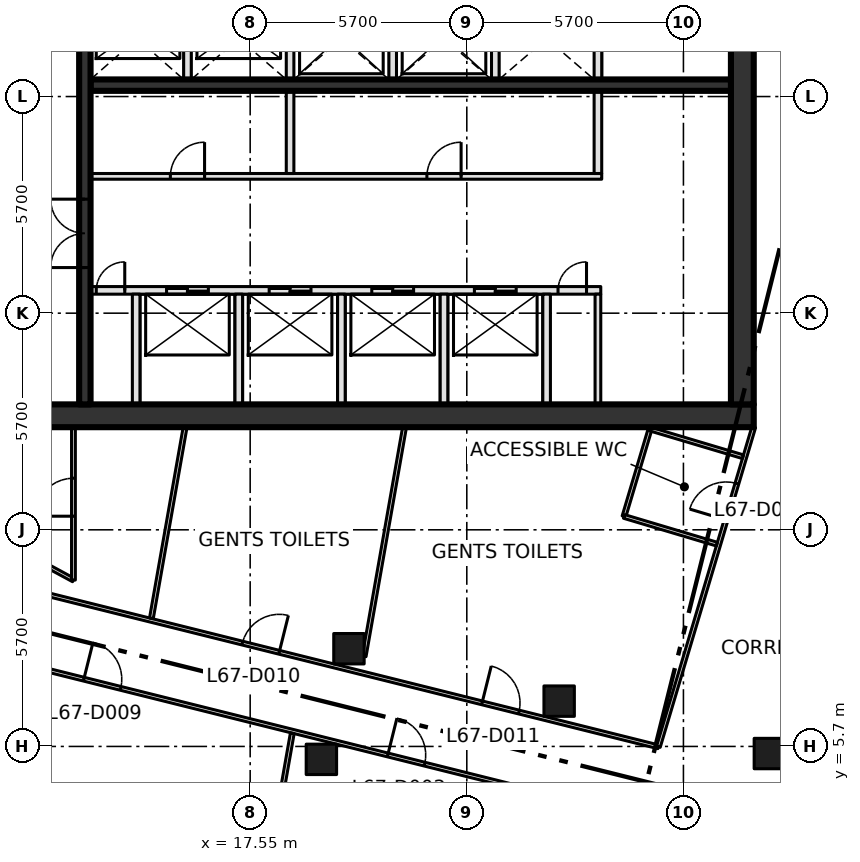
"""IFC4 building model, lengths in metres.
Left out: names, types, materials, properties, quantities, classifications, styles, units other than length and angle.
Written with IfcOpenShell. Run it as: python <this file> out.ifc"""

import sys

from ifc_helpers import new_model, si_unit, direction, frame, frame_2d, origin, origin_2d, place, context, subcontext, project, spatial, rectangle, extrude, element, fill, save


model = new_model("IFC4")
c1 = context("Model", 3, precision=1e-05, world=origin(), true_north=direction((0.0, 1.0)))
c2 = subcontext(c1, "Body", "Model", "MODEL_VIEW")
j1 = project(units=[si_unit("LENGTHUNIT", "METRE"), si_unit("PLANEANGLEUNIT", "RADIAN")], contexts=[c1])
p1 = place(None, origin())
s1 = spatial("IfcSite", under=j1, at=p1, CompositionType="ELEMENT")
p2 = place(p1, origin())
s2 = spatial("IfcBuilding", under=s1, at=p2, CompositionType="ELEMENT")
p3 = place(p2, frame((0.0, 0.0, 294.0)))
s3 = spatial("IfcBuildingStorey", under=s2, at=p3, CompositionType="ELEMENT", Elevation=294.0)
for number, where, z_axis, x_axis in (
    (1, (19.424, 5.36, 0.0), (0.0, 0.0, 1.0), (1.0, 0.0, 0.0)),
    (2, (20.149, 8.271, 0.0), (0.0, 0.0, 1.0), (1.0, 0.0, 0.0)),
    (3, (25.68, 6.892, 0.0), (0.0, 0.0, 1.0), (1.0, 0.0, 0.0)),
    (4, (31.211, 5.513, 0.0), (0.0, 0.0, 1.0), (1.0, 0.0, 0.0)),
):
    element("IfcColumn", number, at=place(p3, frame(where, z_axis=z_axis, x_axis=x_axis)), inside=s3, PredefinedType="COLUMN", context=c2, shape_type="SweptSolid", body=[
        extrude(rectangle(XDim=0.8, YDim=0.8, at=origin_2d()), origin(), (0.0, 0.0, 1.0), 4.2),
    ])
p4 = place(p3, frame((8.0, 14.4, -0.3), z_axis=(0.0, 0.0, 1.0), x_axis=(1.0, 0.0, 0.0)))
e5 = element("IfcWall", 5, at=p4, inside=s3, PredefinedType="SHEAR", context=c2, shape_type="SweptSolid", body=[
    extrude(rectangle(XDim=22.8, YDim=0.6, at=frame_2d((11.4, 0.0))), origin(), (0.0, 0.0, 1.0), 4.2),
])
p5 = place(p4, frame((2.3, 0.0, 0.3)))
e6 = element("IfcOpeningElement", 6, at=p5, cuts=e5, PredefinedType="OPENING", context=c2, shape_type="SweptSolid", body=[
    extrude(rectangle(XDim=1.8, YDim=2.1, at=frame_2d((0.9, 1.05))), frame((0.0, 0.31, 0.0), z_axis=(0.0, -1.0, 0.0), x_axis=(1.0, 0.0, 0.0)), (0.0, 0.0, 1.0), 0.62),
])
p6 = place(p3, frame((30.5, 14.7, -0.3), z_axis=(0.0, 0.0, 1.0), x_axis=(0.0, 1.0, 0.0)))
e7 = element("IfcWall", 7, at=p6, inside=s3, PredefinedType="SHEAR", context=c2, shape_type="SweptSolid", body=[
    extrude(rectangle(XDim=21.0, YDim=0.6, at=frame_2d((10.5, 0.0))), origin(), (0.0, 0.0, 1.0), 4.2),
])
p7 = place(p3, frame((13.35, 17.7, 0.0), z_axis=(0.0, 0.0, 1.0), x_axis=(1.0, 0.0, 0.0)))
e8 = element("IfcWall", 8, at=p7, inside=s3, PredefinedType="SOLIDWALL", context=c2, shape_type="SweptSolid", body=[
    extrude(rectangle(XDim=13.425, YDim=0.2, at=frame_2d((6.712, 0.0))), origin(), (0.0, 0.0, 1.0), 3.9),
])
p8 = place(p7, frame((2.0, 0.0, 0.0)))
e9 = element("IfcOpeningElement", 9, at=p8, cuts=e8, PredefinedType="OPENING", context=c2, shape_type="SweptSolid", body=[
    extrude(rectangle(XDim=1.1, YDim=2.1, at=frame_2d((0.55, 1.05))), frame((0.0, 0.11, 0.0), z_axis=(0.0, -1.0, 0.0), x_axis=(1.0, 0.0, 0.0)), (0.0, 0.0, 1.0), 0.22),
])
p9 = place(p7, frame((4.7, 0.0, 0.0)))
e10 = element("IfcOpeningElement", 10, at=p9, cuts=e8, PredefinedType="OPENING", context=c2, shape_type="SweptSolid", body=[
    extrude(rectangle(XDim=1.1, YDim=2.1, at=frame_2d((0.55, 1.05))), frame((0.0, 0.11, 0.0), z_axis=(0.0, -1.0, 0.0), x_axis=(1.0, 0.0, 0.0)), (0.0, 0.0, 1.0), 0.22),
])
p10 = place(p7, frame((7.4, 0.0, 0.0)))
e11 = element("IfcOpeningElement", 11, at=p10, cuts=e8, PredefinedType="OPENING", context=c2, shape_type="SweptSolid", body=[
    extrude(rectangle(XDim=1.1, YDim=2.1, at=frame_2d((0.55, 1.05))), frame((0.0, 0.11, 0.0), z_axis=(0.0, -1.0, 0.0), x_axis=(1.0, 0.0, 0.0)), (0.0, 0.0, 1.0), 0.22),
])
p11 = place(p7, frame((10.1, 0.0, 0.0)))
e12 = element("IfcOpeningElement", 12, at=p11, cuts=e8, PredefinedType="OPENING", context=c2, shape_type="SweptSolid", body=[
    extrude(rectangle(XDim=1.1, YDim=2.1, at=frame_2d((0.55, 1.05))), frame((0.0, 0.11, 0.0), z_axis=(0.0, -1.0, 0.0), x_axis=(1.0, 0.0, 0.0)), (0.0, 0.0, 1.0), 0.22),
])
p12 = place(p7, frame((0.15, 0.0, 0.0)))
e13 = element("IfcOpeningElement", 13, at=p12, cuts=e8, PredefinedType="OPENING", context=c2, shape_type="SweptSolid", body=[
    extrude(rectangle(XDim=0.75, YDim=2.1, at=frame_2d((0.375, 1.05))), frame((0.0, 0.11, 0.0), z_axis=(0.0, -1.0, 0.0), x_axis=(1.0, 0.0, 0.0)), (0.0, 0.0, 1.0), 0.22),
])
p13 = place(p7, frame((12.3, 0.0, 0.0)))
e14 = element("IfcOpeningElement", 14, at=p13, cuts=e8, PredefinedType="OPENING", context=c2, shape_type="SweptSolid", body=[
    extrude(rectangle(XDim=0.75, YDim=2.1, at=frame_2d((0.375, 1.05))), frame((0.0, 0.11, 0.0), z_axis=(0.0, -1.0, 0.0), x_axis=(1.0, 0.0, 0.0)), (0.0, 0.0, 1.0), 0.22),
])
p14 = place(p3, frame((13.35, 20.7, 0.0), z_axis=(0.0, 0.0, 1.0), x_axis=(1.0, 0.0, 0.0)))
e15 = element("IfcWall", 15, at=p14, inside=s3, PredefinedType="PARTITIONING", context=c2, shape_type="SweptSolid", body=[
    extrude(rectangle(XDim=13.45, YDim=0.15, at=frame_2d((6.725, 0.0))), origin(), (0.0, 0.0, 1.0), 3.9),
])
p15 = place(p14, frame((2.1, 0.0, 0.0)))
e16 = element("IfcOpeningElement", 16, at=p15, cuts=e15, PredefinedType="OPENING", context=c2, shape_type="SweptSolid", body=[
    extrude(rectangle(XDim=0.9, YDim=2.1, at=frame_2d((0.45, 1.05))), frame((0.0, 0.085, 0.0), z_axis=(0.0, -1.0, 0.0), x_axis=(1.0, 0.0, 0.0)), (0.0, 0.0, 1.0), 0.17),
])
p16 = place(p14, frame((8.85, 0.0, 0.0)))
e17 = element("IfcOpeningElement", 17, at=p16, cuts=e15, PredefinedType="OPENING", context=c2, shape_type="SweptSolid", body=[
    extrude(rectangle(XDim=0.9, YDim=2.1, at=frame_2d((0.45, 1.05))), frame((0.0, 0.085, 0.0), z_axis=(0.0, -1.0, 0.0), x_axis=(1.0, 0.0, 0.0)), (0.0, 0.0, 1.0), 0.17),
])
p17 = place(p3, frame((13.35, 23.1, 0.0), z_axis=(0.0, 0.0, 1.0), x_axis=(1.0, 0.0, 0.0)))
e18 = element("IfcWall", 18, at=p17, inside=s3, PredefinedType="SHEAR", context=c2, shape_type="SweptSolid", body=[
    extrude(rectangle(XDim=16.85, YDim=0.3, at=frame_2d((8.425, 0.0))), origin(), (0.0, 0.0, 1.0), 3.9),
])
p18 = place(p3, frame((13.2, 14.7, 0.0), z_axis=(0.0, 0.0, 1.0), x_axis=(0.0, 1.0, 0.0)))
e19 = element("IfcWall", 19, at=p18, inside=s3, PredefinedType="SHEAR", context=c2, shape_type="SweptSolid", body=[
    extrude(rectangle(XDim=21.0, YDim=0.3, at=frame_2d((10.5, 0.0))), origin(), (0.0, 0.0, 1.0), 3.9),
])
p19 = place(p18, frame((3.6, 0.0, 0.0)))
e20 = element("IfcOpeningElement", 20, at=p19, cuts=e19, PredefinedType="OPENING", context=c2, shape_type="SweptSolid", body=[
    extrude(rectangle(XDim=1.8, YDim=2.1, at=frame_2d((0.9, 1.05))), frame((0.0, 0.16, 0.0), z_axis=(0.0, -1.0, 0.0), x_axis=(1.0, 0.0, 0.0)), (0.0, 0.0, 1.0), 0.32),
])
p20 = place(p18, frame((11.7, 0.0, 0.0)))
e21 = element("IfcOpeningElement", 21, at=p20, cuts=e19, PredefinedType="OPENING", context=c2, shape_type="SweptSolid", body=[
    extrude(rectangle(XDim=1.2, YDim=2.1, at=frame_2d((0.6, 1.05))), frame((0.0, 0.16, 0.0), z_axis=(0.0, -1.0, 0.0), x_axis=(1.0, 0.0, 0.0)), (0.0, 0.0, 1.0), 0.32),
])
p21 = place(p3, frame((14.55, 14.7, 0.0), z_axis=(0.0, 0.0, 1.0), x_axis=(0.0, 1.0, 0.0)))
e22 = element("IfcWall", 22, at=p21, inside=s3, PredefinedType="SOLIDWALL", context=c2, shape_type="SweptSolid", body=[
    extrude(rectangle(XDim=2.9, YDim=0.2, at=frame_2d((1.45, 0.0))), origin(), (0.0, 0.0, 1.0), 3.9),
])
p22 = place(p3, frame((15.9, 23.25, 0.0), z_axis=(0.0, 0.0, 1.0), x_axis=(0.0, 1.0, 0.0)))
e23 = element("IfcWall", 23, at=p22, inside=s3, PredefinedType="SOLIDWALL", context=c2, shape_type="SweptSolid", body=[
    extrude(rectangle(XDim=2.15, YDim=0.2, at=frame_2d((1.075, 0.0))), origin(), (0.0, 0.0, 1.0), 3.9),
])
p23 = place(p3, frame((17.25, 14.7, 0.0), z_axis=(0.0, 0.0, 1.0), x_axis=(0.0, 1.0, 0.0)))
e24 = element("IfcWall", 24, at=p23, inside=s3, PredefinedType="SOLIDWALL", context=c2, shape_type="SweptSolid", body=[
    extrude(rectangle(XDim=2.9, YDim=0.2, at=frame_2d((1.45, 0.0))), origin(), (0.0, 0.0, 1.0), 3.9),
])
p24 = place(p3, frame((18.6, 20.775, 0.0), z_axis=(0.0, 0.0, 1.0), x_axis=(0.0, 1.0, 0.0)))
e25 = element("IfcWall", 25, at=p24, inside=s3, PredefinedType="SOLIDWALL", context=c2, shape_type="SweptSolid", body=[
    extrude(rectangle(XDim=7.625, YDim=0.2, at=frame_2d((3.812, 0.0))), origin(), (0.0, 0.0, 1.0), 3.9),
])
p25 = place(p24, frame((5.625, 0.0, 0.0)))
e26 = element("IfcOpeningElement", 26, at=p25, cuts=e25, PredefinedType="OPENING", context=c2, shape_type="SweptSolid", body=[
    extrude(rectangle(XDim=1.2, YDim=2.1, at=frame_2d((0.6, 1.05))), frame((0.0, 0.11, 0.0), z_axis=(0.0, -1.0, 0.0), x_axis=(1.0, 0.0, 0.0)), (0.0, 0.0, 1.0), 0.22),
])
p26 = place(p3, frame((19.95, 14.7, 0.0), z_axis=(0.0, 0.0, 1.0), x_axis=(0.0, 1.0, 0.0)))
e27 = element("IfcWall", 27, at=p26, inside=s3, PredefinedType="SOLIDWALL", context=c2, shape_type="SweptSolid", body=[
    extrude(rectangle(XDim=2.9, YDim=0.2, at=frame_2d((1.45, 0.0))), origin(), (0.0, 0.0, 1.0), 3.9),
])
p27 = place(p3, frame((21.3, 23.25, 0.0), z_axis=(0.0, 0.0, 1.0), x_axis=(0.0, 1.0, 0.0)))
e28 = element("IfcWall", 28, at=p27, inside=s3, PredefinedType="SOLIDWALL", context=c2, shape_type="SweptSolid", body=[
    extrude(rectangle(XDim=2.15, YDim=0.2, at=frame_2d((1.075, 0.0))), origin(), (0.0, 0.0, 1.0), 3.9),
])
p28 = place(p3, frame((22.65, 14.7, 0.0), z_axis=(0.0, 0.0, 1.0), x_axis=(0.0, 1.0, 0.0)))
e29 = element("IfcWall", 29, at=p28, inside=s3, PredefinedType="SOLIDWALL", context=c2, shape_type="SweptSolid", body=[
    extrude(rectangle(XDim=2.9, YDim=0.2, at=frame_2d((1.45, 0.0))), origin(), (0.0, 0.0, 1.0), 3.9),
])
p29 = place(p3, frame((24.0, 23.25, 0.0), z_axis=(0.0, 0.0, 1.0), x_axis=(0.0, 1.0, 0.0)))
e30 = element("IfcWall", 30, at=p29, inside=s3, PredefinedType="SOLIDWALL", context=c2, shape_type="SweptSolid", body=[
    extrude(rectangle(XDim=2.15, YDim=0.2, at=frame_2d((1.075, 0.0))), origin(), (0.0, 0.0, 1.0), 3.9),
])
p30 = place(p3, frame((25.35, 14.7, 0.0), z_axis=(0.0, 0.0, 1.0), x_axis=(0.0, 1.0, 0.0)))
e31 = element("IfcWall", 31, at=p30, inside=s3, PredefinedType="SOLIDWALL", context=c2, shape_type="SweptSolid", body=[
    extrude(rectangle(XDim=2.9, YDim=0.2, at=frame_2d((1.45, 0.0))), origin(), (0.0, 0.0, 1.0), 3.9),
])
p31 = place(p3, frame((26.7, 14.7, 0.0), z_axis=(0.0, 0.0, 1.0), x_axis=(0.0, 1.0, 0.0)))
e32 = element("IfcWall", 32, at=p31, inside=s3, PredefinedType="PARTITIONING", context=c2, shape_type="SweptSolid", body=[
    extrude(rectangle(XDim=2.9, YDim=0.15, at=frame_2d((1.45, 0.0))), origin(), (0.0, 0.0, 1.0), 3.9),
])
p32 = place(p3, frame((26.7, 20.775, 0.0), z_axis=(0.0, 0.0, 1.0), x_axis=(0.0, 1.0, 0.0)))
e33 = element("IfcWall", 33, at=p32, inside=s3, PredefinedType="SOLIDWALL", context=c2, shape_type="SweptSolid", body=[
    extrude(rectangle(XDim=4.625, YDim=0.2, at=frame_2d((2.312, 0.0))), origin(), (0.0, 0.0, 1.0), 3.9),
])
p33 = place(p3, frame((8.535, 8.626, 0.0), z_axis=(0.0, 0.0, 1.0), x_axis=(0.970294986727, -0.241924861749, 0.0)))
e34 = element("IfcWall", 34, at=p33, inside=s3, PredefinedType="PARTITIONING", context=c2, shape_type="SweptSolid", body=[
    extrude(rectangle(XDim=28.501, YDim=0.1, at=frame_2d((14.25, 0.0))), origin(), (0.0, 0.0, 1.0), 3.9),
])
p34 = place(p33, frame((13.022, 0.0, 0.0)))
e35 = element("IfcOpeningElement", 35, at=p34, cuts=e34, PredefinedType="OPENING", context=c2, shape_type="SweptSolid", body=[
    extrude(rectangle(XDim=1.0, YDim=2.1, at=frame_2d((0.5, 1.05))), frame((0.0, 0.06, 0.0), z_axis=(0.0, -1.0, 0.0), x_axis=(1.0, 0.0, 0.0)), (0.0, 0.0, 1.0), 0.12),
])
p35 = place(p33, frame((20.622, 0.0, 0.0)))
e36 = element("IfcOpeningElement", 36, at=p35, cuts=e34, PredefinedType="OPENING", context=c2, shape_type="SweptSolid", body=[
    extrude(rectangle(XDim=1.0, YDim=2.1, at=frame_2d((0.5, 1.05))), frame((0.0, 0.06, 0.0), z_axis=(0.0, -1.0, 0.0), x_axis=(1.0, 0.0, 0.0)), (0.0, 0.0, 1.0), 0.12),
])
p36 = place(p33, frame((4.78, 0.0, 0.0)))
e37 = element("IfcOpeningElement", 37, at=p36, cuts=e34, PredefinedType="OPENING", context=c2, shape_type="SweptSolid", body=[
    extrude(rectangle(XDim=1.0, YDim=2.1, at=frame_2d((0.5, 1.05))), frame((0.0, 0.06, 0.0), z_axis=(0.0, -1.0, 0.0), x_axis=(1.0, 0.0, 0.0)), (0.0, 0.0, 1.0), 0.12),
])
p37 = place(p3, frame((9.002, 10.499, 0.0), z_axis=(0.0, 0.0, 1.0), x_axis=(0.970298340477, -0.241911410372, 0.0)))
e38 = element("IfcWall", 38, at=p37, inside=s3, PredefinedType="PARTITIONING", context=c2, shape_type="SweptSolid", body=[
    extrude(rectangle(XDim=19.88, YDim=0.1, at=frame_2d((9.94, 0.0))), origin(), (0.0, 0.0, 1.0), 3.9),
])
p38 = place(p37, frame((8.597, 0.0, 0.0)))
e39 = element("IfcOpeningElement", 39, at=p38, cuts=e38, PredefinedType="OPENING", context=c2, shape_type="SweptSolid", body=[
    extrude(rectangle(XDim=1.0, YDim=2.1, at=frame_2d((0.5, 1.05))), frame((0.0, 0.06, 0.0), z_axis=(0.0, -1.0, 0.0), x_axis=(1.0, 0.0, 0.0)), (0.0, 0.0, 1.0), 0.12),
])
p39 = place(p37, frame((15.098, 0.0, 0.0)))
e40 = element("IfcOpeningElement", 40, at=p39, cuts=e38, PredefinedType="OPENING", context=c2, shape_type="SweptSolid", body=[
    extrude(rectangle(XDim=1.0, YDim=2.1, at=frame_2d((0.5, 1.05))), frame((0.0, 0.06, 0.0), z_axis=(0.0, -1.0, 0.0), x_axis=(1.0, 0.0, 0.0)), (0.0, 0.0, 1.0), 0.12),
])
p40 = place(p3, frame((9.9, 11.7, 0.0), z_axis=(0.0, 0.0, 1.0), x_axis=(0.87965147249, -0.475618846291, 0.0)))
e41 = element("IfcWall", 41, at=p40, inside=s3, PredefinedType="PARTITIONING", context=c2, shape_type="SweptSolid", body=[
    extrude(rectangle(XDim=3.41, YDim=0.1, at=frame_2d((1.705, 0.0))), origin(), (0.0, 0.0, 1.0), 3.9),
])
p41 = place(p3, frame((12.9, 10.078, 0.0), z_axis=(0.0, 0.0, 1.0), x_axis=(0.0, 1.0, 0.0)))
e42 = element("IfcWall", 42, at=p41, inside=s3, PredefinedType="PARTITIONING", context=c2, shape_type="SweptSolid", body=[
    extrude(rectangle(XDim=4.022, YDim=0.1, at=frame_2d((2.011, 0.0))), origin(), (0.0, 0.0, 1.0), 3.9),
])
p42 = place(p41, frame((1.68, 0.0, 0.0)))
e43 = element("IfcOpeningElement", 43, at=p42, cuts=e42, PredefinedType="OPENING", context=c2, shape_type="SweptSolid", body=[
    extrude(rectangle(XDim=1.0, YDim=2.1, at=frame_2d((0.5, 1.05))), frame((0.0, 0.06, 0.0), z_axis=(0.0, -1.0, 0.0), x_axis=(1.0, 0.0, 0.0)), (0.0, 0.0, 1.0), 0.12),
])
p43 = place(p3, frame((28.291, 5.69, 0.0), z_axis=(0.0, 0.0, 1.0), x_axis=(0.28588265334, 0.958264633867, 0.0)))
e44 = element("IfcWall", 44, at=p43, inside=s3, PredefinedType="PARTITIONING", context=c2, shape_type="SweptSolid", body=[
    extrude(rectangle(XDim=8.776, YDim=0.1, at=frame_2d((4.388, 0.0))), origin(), (0.0, 0.0, 1.0), 3.9),
])
p44 = place(p43, frame((6.23, 0.0, 0.0)))
e45 = element("IfcOpeningElement", 45, at=p44, cuts=e44, PredefinedType="OPENING", context=c2, shape_type="SweptSolid", body=[
    extrude(rectangle(XDim=1.0, YDim=2.1, at=frame_2d((0.5, 1.05))), frame((0.0, 0.06, 0.0), z_axis=(0.0, -1.0, 0.0), x_axis=(1.0, 0.0, 0.0)), (0.0, 0.0, 1.0), 0.12),
])
p45 = place(p3, frame((14.951, 9.071, 0.0), z_axis=(0.0, 0.0, 1.0), x_axis=(0.173687149785, 0.984800880381, 0.0)))
e46 = element("IfcWall", 46, at=p45, inside=s3, PredefinedType="PARTITIONING", context=c2, shape_type="SweptSolid", body=[
    extrude(rectangle(XDim=5.107, YDim=0.1, at=frame_2d((2.553, 0.0))), origin(), (0.0, 0.0, 1.0), 3.9),
])
p46 = place(p3, frame((17.021, -3.238, 0.0), z_axis=(0.0, 0.0, 1.0), x_axis=(0.173621363154, 0.984812480758, 0.0)))
e47 = element("IfcWall", 47, at=p46, inside=s3, PredefinedType="PARTITIONING", context=c2, shape_type="SweptSolid", body=[
    extrude(rectangle(XDim=9.428, YDim=0.1, at=frame_2d((4.714, 0.0))), origin(), (0.0, 0.0, 1.0), 3.9),
])
p47 = place(p3, frame((20.549, 8.07, 0.0), z_axis=(0.0, 0.0, 1.0), x_axis=(0.173605636367, 0.984815253244, 0.0)))
e48 = element("IfcWall", 48, at=p47, inside=s3, PredefinedType="PARTITIONING", context=c2, shape_type="SweptSolid", body=[
    extrude(rectangle(XDim=6.123, YDim=0.1, at=frame_2d((3.062, 0.0))), origin(), (0.0, 0.0, 1.0), 3.9),
])
p48 = place(p3, frame((27.386, 11.752, 0.0), z_axis=(0.0, 0.0, 1.0), x_axis=(0.285826425332, 0.958281406781, 0.0)))
e49 = element("IfcWall", 49, at=p48, inside=s3, PredefinedType="PARTITIONING", context=c2, shape_type="SweptSolid", body=[
    extrude(rectangle(XDim=2.4, YDim=0.1, at=frame_2d((1.2, 0.0))), origin(), (0.0, 0.0, 1.0), 3.9),
])
for number, where, z_axis, x_axis in (
    (50, (28.072, 14.052, 0.0), (0.0, 0.0, 1.0), (0.958, -0.286, 0.0)),
    (51, (29.83, 11.023, 0.0), (0.0, 0.0, 1.0), (-0.958, 0.286, 0.0)),
):
    element("IfcWall", number, at=place(p3, frame(where, z_axis=z_axis, x_axis=x_axis)), inside=s3, PredefinedType="PARTITIONING", context=c2, shape_type="SweptSolid", body=[
        extrude(rectangle(XDim=2.551, YDim=0.1, at=frame_2d((1.275, 0.0))), origin(), (0.0, 0.0, 1.0), 3.9),
    ])
p49 = place(p8, origin())
e52 = element("IfcDoor", 52, at=p49, inside=s3, OperationType="SLIDING_TO_LEFT", PredefinedType="DOOR", context=c2, shape_type="SweptSolid", body=[
    extrude(rectangle(XDim=1.1, YDim=2.1, at=frame_2d((0.55, 1.05))), frame((0.0, 0.025, 0.0), z_axis=(0.0, -1.0, 0.0), x_axis=(1.0, 0.0, 0.0)), (0.0, 0.0, 1.0), 0.05),
])
fill(e9, e52)
p50 = place(p9, origin())
e53 = element("IfcDoor", 53, at=p50, inside=s3, OperationType="SLIDING_TO_LEFT", PredefinedType="DOOR", context=c2, shape_type="SweptSolid", body=[
    extrude(rectangle(XDim=1.1, YDim=2.1, at=frame_2d((0.55, 1.05))), frame((0.0, 0.025, 0.0), z_axis=(0.0, -1.0, 0.0), x_axis=(1.0, 0.0, 0.0)), (0.0, 0.0, 1.0), 0.05),
])
fill(e10, e53)
p51 = place(p10, origin())
e54 = element("IfcDoor", 54, at=p51, inside=s3, OperationType="SLIDING_TO_LEFT", PredefinedType="DOOR", context=c2, shape_type="SweptSolid", body=[
    extrude(rectangle(XDim=1.1, YDim=2.1, at=frame_2d((0.55, 1.05))), frame((0.0, 0.025, 0.0), z_axis=(0.0, -1.0, 0.0), x_axis=(1.0, 0.0, 0.0)), (0.0, 0.0, 1.0), 0.05),
])
fill(e11, e54)
p52 = place(p11, origin())
e55 = element("IfcDoor", 55, at=p52, inside=s3, OperationType="SLIDING_TO_LEFT", PredefinedType="DOOR", context=c2, shape_type="SweptSolid", body=[
    extrude(rectangle(XDim=1.1, YDim=2.1, at=frame_2d((0.55, 1.05))), frame((0.0, 0.025, 0.0), z_axis=(0.0, -1.0, 0.0), x_axis=(1.0, 0.0, 0.0)), (0.0, 0.0, 1.0), 0.05),
])
fill(e12, e55)
p53 = place(p12, origin())
e56 = element("IfcDoor", 56, at=p53, inside=s3, OperationType="SINGLE_SWING_RIGHT", PredefinedType="DOOR", context=c2, shape_type="SweptSolid", body=[
    extrude(rectangle(XDim=0.75, YDim=2.1, at=frame_2d((0.375, 1.05))), frame((0.0, 0.025, 0.0), z_axis=(0.0, -1.0, 0.0), x_axis=(1.0, 0.0, 0.0)), (0.0, 0.0, 1.0), 0.05),
])
fill(e13, e56)
p54 = place(p13, origin())
e57 = element("IfcDoor", 57, at=p54, inside=s3, OperationType="SINGLE_SWING_RIGHT", PredefinedType="DOOR", context=c2, shape_type="SweptSolid", body=[
    extrude(rectangle(XDim=0.75, YDim=2.1, at=frame_2d((0.375, 1.05))), frame((0.0, 0.025, 0.0), z_axis=(0.0, -1.0, 0.0), x_axis=(1.0, 0.0, 0.0)), (0.0, 0.0, 1.0), 0.05),
])
fill(e14, e57)
p55 = place(p15, origin())
e58 = element("IfcDoor", 58, at=p55, inside=s3, OperationType="SINGLE_SWING_RIGHT", PredefinedType="DOOR", context=c2, shape_type="SweptSolid", body=[
    extrude(rectangle(XDim=0.9, YDim=2.1, at=frame_2d((0.45, 1.05))), frame((0.0, 0.025, 0.0), z_axis=(0.0, -1.0, 0.0), x_axis=(1.0, 0.0, 0.0)), (0.0, 0.0, 1.0), 0.05),
])
fill(e16, e58)
p56 = place(p16, origin())
e59 = element("IfcDoor", 59, at=p56, inside=s3, OperationType="SINGLE_SWING_RIGHT", PredefinedType="DOOR", context=c2, shape_type="SweptSolid", body=[
    extrude(rectangle(XDim=0.9, YDim=2.1, at=frame_2d((0.45, 1.05))), frame((0.0, 0.025, 0.0), z_axis=(0.0, -1.0, 0.0), x_axis=(1.0, 0.0, 0.0)), (0.0, 0.0, 1.0), 0.05),
])
fill(e17, e59)
p57 = place(p19, origin())
e60 = element("IfcDoor", 60, at=p57, inside=s3, OperationType="DOUBLE_DOOR_SINGLE_SWING", PredefinedType="DOOR", context=c2, shape_type="SweptSolid", body=[
    extrude(rectangle(XDim=1.8, YDim=2.1, at=frame_2d((0.9, 1.05))), frame((0.0, 0.025, 0.0), z_axis=(0.0, -1.0, 0.0), x_axis=(1.0, 0.0, 0.0)), (0.0, 0.0, 1.0), 0.05),
])
fill(e20, e60)
p58 = place(p34, origin())
e61 = element("IfcDoor", 61, at=p58, inside=s3, OperationType="SINGLE_SWING_LEFT", PredefinedType="DOOR", context=c2, shape_type="SweptSolid", body=[
    extrude(rectangle(XDim=1.0, YDim=2.1, at=frame_2d((0.5, 1.05))), frame((0.0, 0.025, 0.0), z_axis=(0.0, -1.0, 0.0), x_axis=(1.0, 0.0, 0.0)), (0.0, 0.0, 1.0), 0.05),
])
fill(e35, e61)
p59 = place(p36, origin())
e62 = element("IfcDoor", 62, at=p59, inside=s3, OperationType="SINGLE_SWING_LEFT", PredefinedType="DOOR", context=c2, shape_type="SweptSolid", body=[
    extrude(rectangle(XDim=1.0, YDim=2.1, at=frame_2d((0.5, 1.05))), frame((0.0, 0.025, 0.0), z_axis=(0.0, -1.0, 0.0), x_axis=(1.0, 0.0, 0.0)), (0.0, 0.0, 1.0), 0.05),
])
fill(e37, e62)
p60 = place(p38, origin())
e63 = element("IfcDoor", 63, at=p60, inside=s3, OperationType="SINGLE_SWING_RIGHT", PredefinedType="DOOR", context=c2, shape_type="SweptSolid", body=[
    extrude(rectangle(XDim=1.0, YDim=2.1, at=frame_2d((0.5, 1.05))), frame((0.0, 0.025, 0.0), z_axis=(0.0, -1.0, 0.0), x_axis=(1.0, 0.0, 0.0)), (0.0, 0.0, 1.0), 0.05),
])
fill(e39, e63)
p61 = place(p39, origin())
e64 = element("IfcDoor", 64, at=p61, inside=s3, OperationType="SINGLE_SWING_LEFT", PredefinedType="DOOR", context=c2, shape_type="SweptSolid", body=[
    extrude(rectangle(XDim=1.0, YDim=2.1, at=frame_2d((0.5, 1.05))), frame((0.0, 0.025, 0.0), z_axis=(0.0, -1.0, 0.0), x_axis=(1.0, 0.0, 0.0)), (0.0, 0.0, 1.0), 0.05),
])
fill(e40, e64)
p62 = place(p42, origin())
e65 = element("IfcDoor", 65, at=p62, inside=s3, OperationType="SINGLE_SWING_LEFT", PredefinedType="DOOR", context=c2, shape_type="SweptSolid", body=[
    extrude(rectangle(XDim=1.0, YDim=2.1, at=frame_2d((0.5, 1.05))), frame((0.0, 0.025, 0.0), z_axis=(0.0, -1.0, 0.0), x_axis=(1.0, 0.0, 0.0)), (0.0, 0.0, 1.0), 0.05),
])
fill(e43, e65)
p63 = place(p44, origin())
e66 = element("IfcDoor", 66, at=p63, inside=s3, OperationType="SINGLE_SWING_LEFT", PredefinedType="DOOR", context=c2, shape_type="SweptSolid", body=[
    extrude(rectangle(XDim=1.0, YDim=2.1, at=frame_2d((0.5, 1.05))), frame((0.0, 0.025, 0.0), z_axis=(0.0, -1.0, 0.0), x_axis=(1.0, 0.0, 0.0)), (0.0, 0.0, 1.0), 0.05),
])
fill(e45, e66)
save(model, sys.argv[1])
